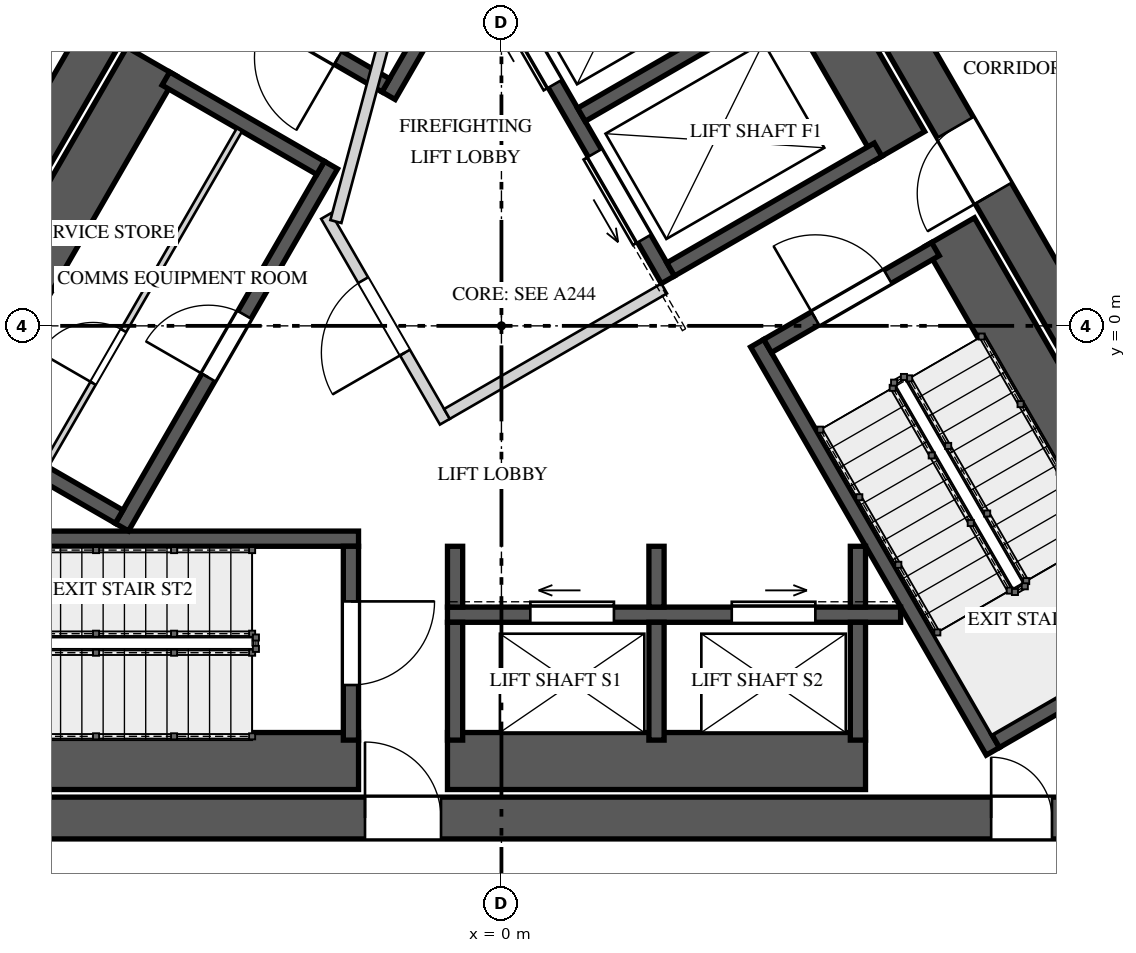
"""IFC4 building model, lengths in metres.
Left out: names, types, materials, properties, quantities, classifications, styles, units other than length and angle.
Written with IfcOpenShell. Run it as: python <this file> out.ifc"""

import sys

from ifc_helpers import new_model, si_unit, direction, frame, frame_2d, origin, place, context, subcontext, project, spatial, rectangle, extrude, element, fill, save


model = new_model("IFC4")
c1 = context("Model", 3, precision=1e-05, world=origin(), true_north=direction((0.0, 1.0)))
c2 = subcontext(c1, "Body", "Model", "MODEL_VIEW")
j1 = project(units=[si_unit("LENGTHUNIT", "METRE"), si_unit("PLANEANGLEUNIT", "RADIAN")], contexts=[c1])
p1 = place(None, origin())
s1 = spatial("IfcSite", under=j1, at=p1, CompositionType="ELEMENT")
p2 = place(p1, origin())
s2 = spatial("IfcBuilding", under=s1, at=p2, CompositionType="ELEMENT")
p3 = place(p2, frame((0.0, 0.0, 348.4)))
s3 = spatial("IfcBuildingStorey", under=s2, at=p3, CompositionType="ELEMENT", Elevation=348.4)
p4 = place(p3, frame((-1.285, 10.725, 0.0), z_axis=(0.0, 0.0, 1.0), x_axis=(-0.499994590896, -0.86602852671, 0.0)))
e1 = element("IfcWall", 1, at=p4, inside=s3, PredefinedType="SHEAR", context=c2, shape_type="SweptSolid", body=[
    extrude(rectangle(XDim=17.292, YDim=0.55, at=frame_2d((8.646, 0.0))), origin(), (0.0, 0.0, 1.0), 4.0),
])
p5 = place(p4, frame((6.851, 0.0, 0.0)))
e2 = element("IfcOpeningElement", 2, at=p5, cuts=e1, PredefinedType="OPENING", context=c2, shape_type="SweptSolid", body=[
    extrude(rectangle(XDim=1.0, YDim=2.4, at=frame_2d((0.5, 1.2))), frame((0.0, 0.285, 0.0), z_axis=(0.0, -1.0, 0.0), x_axis=(1.0, 0.0, 0.0)), (0.0, 0.0, 1.0), 0.57),
])
p6 = place(p4, frame((15.089, 0.0, 0.0)))
e3 = element("IfcOpeningElement", 3, at=p6, cuts=e1, PredefinedType="OPENING", context=c2, shape_type="SweptSolid", body=[
    extrude(rectangle(XDim=0.8, YDim=2.1, at=frame_2d((0.4, 1.05))), frame((0.0, 0.285, 0.0), z_axis=(0.0, -1.0, 0.0), x_axis=(1.0, 0.0, 0.0)), (0.0, 0.0, 1.0), 0.57),
])
p7 = place(p3, frame((-8.646, -6.475, 0.0), z_axis=(0.0, 0.0, 1.0), x_axis=(1.0, 0.0, 0.0)))
e4 = element("IfcWall", 4, at=p7, inside=s3, PredefinedType="SHEAR", context=c2, shape_type="SweptSolid", body=[
    extrude(rectangle(XDim=17.292, YDim=0.55, at=frame_2d((8.646, 0.0))), origin(), (0.0, 0.0, 1.0), 4.0),
])
p8 = place(p7, frame((6.851, 0.0, 0.0)))
e5 = element("IfcOpeningElement", 5, at=p8, cuts=e4, PredefinedType="OPENING", context=c2, shape_type="SweptSolid", body=[
    extrude(rectangle(XDim=1.0, YDim=2.4, at=frame_2d((0.5, 1.2))), frame((0.0, 0.285, 0.0), z_axis=(0.0, -1.0, 0.0), x_axis=(1.0, 0.0, 0.0)), (0.0, 0.0, 1.0), 0.57),
])
p9 = place(p7, frame((15.089, 0.0, 0.0)))
e6 = element("IfcOpeningElement", 6, at=p9, cuts=e4, PredefinedType="OPENING", context=c2, shape_type="SweptSolid", body=[
    extrude(rectangle(XDim=0.8, YDim=2.1, at=frame_2d((0.4, 1.05))), frame((0.0, 0.285, 0.0), z_axis=(0.0, -1.0, 0.0), x_axis=(1.0, 0.0, 0.0)), (0.0, 0.0, 1.0), 0.57),
])
p10 = place(p3, frame((9.93, -4.25, 0.0), z_axis=(0.0, 0.0, 1.0), x_axis=(-0.499994590896, 0.86602852671, 0.0)))
e7 = element("IfcWall", 7, at=p10, inside=s3, PredefinedType="SHEAR", context=c2, shape_type="SweptSolid", body=[
    extrude(rectangle(XDim=17.292, YDim=0.55, at=frame_2d((8.646, 0.0))), origin(), (0.0, 0.0, 1.0), 4.0),
])
p11 = place(p10, frame((6.921, 0.0, 0.0)))
e8 = element("IfcOpeningElement", 8, at=p11, cuts=e7, PredefinedType="OPENING", context=c2, shape_type="SweptSolid", body=[
    extrude(rectangle(XDim=1.0, YDim=2.4, at=frame_2d((0.5, 1.2))), frame((0.0, 0.285, 0.0), z_axis=(0.0, -1.0, 0.0), x_axis=(1.0, 0.0, 0.0)), (0.0, 0.0, 1.0), 0.57),
])
p12 = place(p3, frame((1.615, 8.397, 0.0), z_axis=(0.0, 0.0, 1.0), x_axis=(-0.500009909098, -0.866019682689, 0.0)))
e9 = element("IfcWall", 9, at=p12, inside=s3, PredefinedType="SOLIDWALL", context=c2, shape_type="SweptSolid", body=[
    extrude(rectangle(XDim=6.2, YDim=0.2, at=frame_2d((3.1, 0.0))), origin(), (0.0, 0.0, 1.0), 3.65),
])
p13 = place(p3, frame((-1.521, 3.165, 0.0), z_axis=(0.0, 0.0, 1.0), x_axis=(-0.866030925526, 0.499990435942, 0.0)))
e10 = element("IfcWall", 10, at=p13, inside=s3, PredefinedType="SOLIDWALL", context=c2, shape_type="SweptSolid", body=[
    extrude(rectangle(XDim=2.55, YDim=0.2, at=frame_2d((1.275, 0.0))), origin(), (0.0, 0.0, 1.0), 3.65),
])
p14 = place(p13, frame((0.725, 0.0, 0.0)))
e11 = element("IfcOpeningElement", 11, at=p14, cuts=e10, PredefinedType="OPENING", context=c2, shape_type="SweptSolid", body=[
    extrude(rectangle(XDim=1.1, YDim=2.4, at=frame_2d((0.55, 1.2))), frame((0.0, 0.11, 0.0), z_axis=(0.0, -1.0, 0.0), x_axis=(1.0, 0.0, 0.0)), (0.0, 0.0, 1.0), 0.22),
])
p15 = place(p3, frame((-8.08, -5.725, 0.0), z_axis=(0.0, 0.0, 1.0), x_axis=(1.0, 0.0, 0.0)))
e12 = element("IfcWall", 12, at=p15, inside=s3, PredefinedType="SOLIDWALL", context=c2, shape_type="SweptSolid", body=[
    extrude(rectangle(XDim=6.2, YDim=0.75, at=frame_2d((3.1, 0.0))), origin(), (0.0, 0.0, 1.0), 3.65),
])
p16 = place(p3, frame((-8.08, -2.8, 0.0), z_axis=(0.0, 0.0, 1.0), x_axis=(1.0, 0.0, 0.0)))
e13 = element("IfcWall", 13, at=p16, inside=s3, PredefinedType="SOLIDWALL", context=c2, shape_type="SweptSolid", body=[
    extrude(rectangle(XDim=6.2, YDim=0.2, at=frame_2d((3.1, 0.0))), origin(), (0.0, 0.0, 1.0), 3.65),
])
p17 = place(p3, frame((-1.98, -2.9, 0.0), z_axis=(0.0, 0.0, 1.0), x_axis=(0.0, -1.0, 0.0)))
e14 = element("IfcWall", 14, at=p17, inside=s3, PredefinedType="SOLIDWALL", context=c2, shape_type="SweptSolid", body=[
    extrude(rectangle(XDim=2.55, YDim=0.2, at=frame_2d((1.275, 0.0))), origin(), (0.0, 0.0, 1.0), 3.65),
])
p18 = place(p17, frame((0.725, 0.0, 0.0)))
e15 = element("IfcOpeningElement", 15, at=p18, cuts=e14, PredefinedType="OPENING", context=c2, shape_type="SweptSolid", body=[
    extrude(rectangle(XDim=1.1, YDim=2.4, at=frame_2d((0.55, 1.2))), frame((0.0, 0.11, 0.0), z_axis=(0.0, -1.0, 0.0), x_axis=(1.0, 0.0, 0.0)), (0.0, 0.0, 1.0), 0.22),
])
p19 = place(p3, frame((8.998, -4.135, 0.0), z_axis=(0.0, 0.0, 1.0), x_axis=(-0.500009909098, 0.866019682689, 0.0)))
e16 = element("IfcWall", 16, at=p19, inside=s3, PredefinedType="SOLIDWALL", context=c2, shape_type="SweptSolid", body=[
    extrude(rectangle(XDim=6.2, YDim=0.75, at=frame_2d((3.1, 0.0))), origin(), (0.0, 0.0, 1.0), 3.65),
])
p20 = place(p3, frame((6.465, -5.597, 0.0), z_axis=(0.0, 0.0, 1.0), x_axis=(-0.49998037582, 0.866036733513, 0.0)))
e17 = element("IfcWall", 17, at=p20, inside=s3, PredefinedType="SOLIDWALL", context=c2, shape_type="SweptSolid", body=[
    extrude(rectangle(XDim=6.2, YDim=0.2, at=frame_2d((3.1, 0.0))), origin(), (0.0, 0.0, 1.0), 3.65),
])
p21 = place(p3, frame((6.501, -5.461, 0.0), z_axis=(0.0, 0.0, 1.0), x_axis=(0.865989465428, 0.500062241894, 0.0)))
e18 = element("IfcWall", 18, at=p21, inside=s3, PredefinedType="SOLIDWALL", context=c2, shape_type="SweptSolid", body=[
    extrude(rectangle(XDim=2.55, YDim=0.2, at=frame_2d((1.275, 0.0))), origin(), (0.0, 0.0, 1.0), 3.65),
])
p22 = place(p3, frame((3.501, -0.265, 0.0), z_axis=(0.0, 0.0, 1.0), x_axis=(0.866030925526, 0.499990435942, 0.0)))
e19 = element("IfcWall", 19, at=p22, inside=s3, PredefinedType="SOLIDWALL", context=c2, shape_type="SweptSolid", body=[
    extrude(rectangle(XDim=2.55, YDim=0.2, at=frame_2d((1.275, 0.0))), origin(), (0.0, 0.0, 1.0), 3.65),
])
p23 = place(p22, frame((0.725, 0.0, 0.0)))
e20 = element("IfcOpeningElement", 20, at=p23, cuts=e19, PredefinedType="OPENING", context=c2, shape_type="SweptSolid", body=[
    extrude(rectangle(XDim=1.1, YDim=2.4, at=frame_2d((0.55, 1.2))), frame((0.0, 0.11, 0.0), z_axis=(0.0, -1.0, 0.0), x_axis=(1.0, 0.0, 0.0)), (0.0, 0.0, 1.0), 0.22),
])
p24 = place(p3, frame((-4.993, -2.648, 0.0), z_axis=(0.0, 0.0, 1.0), x_axis=(0.499996545922, 0.866027397988, 0.0)))
e21 = element("IfcWall", 21, at=p24, inside=s3, PredefinedType="SOLIDWALL", context=c2, shape_type="SweptSolid", body=[
    extrude(rectangle(XDim=5.5, YDim=0.2, at=frame_2d((2.75, 0.0))), origin(), (0.0, 0.0, 1.0), 3.65),
])
p25 = place(p24, frame((2.275, 0.0, 0.0)))
e22 = element("IfcOpeningElement", 22, at=p25, cuts=e21, PredefinedType="OPENING", context=c2, shape_type="SweptSolid", body=[
    extrude(rectangle(XDim=0.95, YDim=2.4, at=frame_2d((0.475, 1.2))), frame((0.0, 0.11, 0.0), z_axis=(0.0, -1.0, 0.0), x_axis=(1.0, 0.0, 0.0)), (0.0, 0.0, 1.0), 0.22),
])
p26 = place(p3, frame((-4.603, 3.477, 0.0), z_axis=(0.0, 0.0, 1.0), x_axis=(-0.500015767406, -0.866016300277, 0.0)))
e23 = element("IfcWall", 23, at=p26, inside=s3, PredefinedType="SOLIDWALL", context=c2, shape_type="SweptSolid", body=[
    extrude(rectangle(XDim=5.5, YDim=0.75, at=frame_2d((2.75, 0.0))), origin(), (0.0, 0.0, 1.0), 3.65),
])
p27 = place(p3, frame((-2.38, 2.078, 0.0), z_axis=(0.0, 0.0, 1.0), x_axis=(-0.866061024631, 0.499938297808, 0.0)))
e24 = element("IfcWall", 24, at=p27, inside=s3, PredefinedType="SOLIDWALL", context=c2, shape_type="SweptSolid", body=[
    extrude(rectangle(XDim=2.35, YDim=0.2, at=frame_2d((1.175, 0.0))), origin(), (0.0, 0.0, 1.0), 3.65),
])
p28 = place(p3, frame((-5.03, -2.512, 0.0), z_axis=(0.0, 0.0, 1.0), x_axis=(-0.866016039709, 0.500016218704, 0.0)))
e25 = element("IfcWall", 25, at=p28, inside=s3, PredefinedType="SOLIDWALL", context=c2, shape_type="SweptSolid", body=[
    extrude(rectangle(XDim=2.35, YDim=0.2, at=frame_2d((1.175, 0.0))), origin(), (0.0, 0.0, 1.0), 3.65),
])
p29 = place(p3, frame((-5.997, -1.838, 0.0), z_axis=(0.0, 0.0, 1.0), x_axis=(0.500005610874, 0.86602216432, 0.0)))
e26 = element("IfcWall", 26, at=p29, inside=s3, PredefinedType="PARTITIONING", context=c2, shape_type="SweptSolid", body=[
    extrude(rectangle(XDim=5.1, YDim=0.08, at=frame_2d((2.55, 0.0))), origin(), (0.0, 0.0, 1.0), 3.65),
])
p30 = place(p29, frame((1.25, 0.0, 0.0)))
e27 = element("IfcOpeningElement", 27, at=p30, cuts=e26, PredefinedType="OPENING", context=c2, shape_type="SweptSolid", body=[
    extrude(rectangle(XDim=0.8, YDim=2.1, at=frame_2d((0.4, 1.05))), frame((0.0, 0.05, 0.0), z_axis=(0.0, -1.0, 0.0), x_axis=(1.0, 0.0, 0.0)), (0.0, 0.0, 1.0), 0.1),
])
p31 = place(p3, frame((-0.71, -3.8, 0.0), z_axis=(0.0, 0.0, 1.0), x_axis=(1.0, 0.0, 0.0)))
e28 = element("IfcWall", 28, at=p31, inside=s3, PredefinedType="SOLIDWALL", context=c2, shape_type="SweptSolid", body=[
    extrude(rectangle(XDim=5.961, YDim=0.2, at=frame_2d((2.981, 0.0))), origin(), (0.0, 0.0, 1.0), 3.65),
])
p32 = place(p31, frame((1.09, 0.0, 0.0)))
e29 = element("IfcOpeningElement", 29, at=p32, cuts=e28, PredefinedType="OPENING", context=c2, shape_type="SweptSolid", body=[
    extrude(rectangle(XDim=1.1, YDim=2.1, at=frame_2d((0.55, 1.05))), frame((0.0, 0.11, 0.0), z_axis=(0.0, -1.0, 0.0), x_axis=(1.0, 0.0, 0.0)), (0.0, 0.0, 1.0), 0.22),
])
p33 = place(p31, frame((3.74, 0.0, 0.0)))
e30 = element("IfcOpeningElement", 30, at=p33, cuts=e28, PredefinedType="OPENING", context=c2, shape_type="SweptSolid", body=[
    extrude(rectangle(XDim=1.1, YDim=2.1, at=frame_2d((0.55, 1.05))), frame((0.0, 0.11, 0.0), z_axis=(0.0, -1.0, 0.0), x_axis=(1.0, 0.0, 0.0)), (0.0, 0.0, 1.0), 0.22),
])
p34 = place(p3, frame((-0.71, -5.725, 0.0), z_axis=(0.0, 0.0, 1.0), x_axis=(1.0, 0.0, 0.0)))
e31 = element("IfcWall", 31, at=p34, inside=s3, PredefinedType="SOLIDWALL", context=c2, shape_type="SweptSolid", body=[
    extrude(rectangle(XDim=5.5, YDim=0.75, at=frame_2d((2.75, 0.0))), origin(), (0.0, 0.0, 1.0), 3.65),
])
p35 = place(p3, frame((-0.61, -3.9, 0.0), z_axis=(0.0, 0.0, 1.0), x_axis=(0.0, -1.0, 0.0)))
e32 = element("IfcWall", 32, at=p35, inside=s3, PredefinedType="SOLIDWALL", context=c2, shape_type="SweptSolid", body=[
    extrude(rectangle(XDim=1.55, YDim=0.2, at=frame_2d((0.775, 0.0))), origin(), (0.0, 0.0, 1.0), 3.65),
])
p36 = place(p3, frame((-0.61, -2.9, 0.0), z_axis=(0.0, 0.0, 1.0), x_axis=(0.0, -1.0, 0.0)))
e33 = element("IfcWall", 33, at=p36, inside=s3, PredefinedType="SOLIDWALL", context=c2, shape_type="SweptSolid", body=[
    extrude(rectangle(XDim=0.8, YDim=0.2, at=frame_2d((0.4, 0.0))), origin(), (0.0, 0.0, 1.0), 3.65),
])
p37 = place(p3, frame((2.04, -3.9, 0.0), z_axis=(0.0, 0.0, 1.0), x_axis=(0.0, -1.0, 0.0)))
e34 = element("IfcWall", 34, at=p37, inside=s3, PredefinedType="SOLIDWALL", context=c2, shape_type="SweptSolid", body=[
    extrude(rectangle(XDim=1.55, YDim=0.2, at=frame_2d((0.775, 0.0))), origin(), (0.0, 0.0, 1.0), 3.65),
])
p38 = place(p3, frame((2.04, -2.9, 0.0), z_axis=(0.0, 0.0, 1.0), x_axis=(0.0, -1.0, 0.0)))
e35 = element("IfcWall", 35, at=p38, inside=s3, PredefinedType="SOLIDWALL", context=c2, shape_type="SweptSolid", body=[
    extrude(rectangle(XDim=0.8, YDim=0.2, at=frame_2d((0.4, 0.0))), origin(), (0.0, 0.0, 1.0), 3.65),
])
p39 = place(p3, frame((4.69, -3.9, 0.0), z_axis=(0.0, 0.0, 1.0), x_axis=(0.0, -1.0, 0.0)))
e36 = element("IfcWall", 36, at=p39, inside=s3, PredefinedType="SOLIDWALL", context=c2, shape_type="SweptSolid", body=[
    extrude(rectangle(XDim=1.55, YDim=0.2, at=frame_2d((0.775, 0.0))), origin(), (0.0, 0.0, 1.0), 3.65),
])
p40 = place(p3, frame((4.69, -2.9, 0.0), z_axis=(0.0, 0.0, 1.0), x_axis=(0.0, -1.0, 0.0)))
e37 = element("IfcWall", 37, at=p40, inside=s3, PredefinedType="SOLIDWALL", context=c2, shape_type="SweptSolid", body=[
    extrude(rectangle(XDim=0.8, YDim=0.2, at=frame_2d((0.4, 0.0))), origin(), (0.0, 0.0, 1.0), 3.65),
])
p41 = place(p3, frame((2.19, 0.606, 0.0), z_axis=(0.0, 0.0, 1.0), x_axis=(-0.500002801628, 0.866023786258, 0.0)))
e38 = element("IfcWall", 38, at=p41, inside=s3, PredefinedType="SOLIDWALL", context=c2, shape_type="SweptSolid", body=[
    extrude(rectangle(XDim=4.9, YDim=0.2, at=frame_2d((2.45, 0.0))), origin(), (0.0, 0.0, 1.0), 3.65),
])
p42 = place(p41, frame((0.625, 0.0, 0.0)))
e39 = element("IfcOpeningElement", 39, at=p42, cuts=e38, PredefinedType="OPENING", context=c2, shape_type="SweptSolid", body=[
    extrude(rectangle(XDim=1.3, YDim=2.1, at=frame_2d((0.65, 1.05))), frame((0.0, 0.11, 0.0), z_axis=(0.0, -1.0, 0.0), x_axis=(1.0, 0.0, 0.0)), (0.0, 0.0, 1.0), 0.22),
])
p43 = place(p41, frame((2.975, 0.0, 0.0)))
e40 = element("IfcOpeningElement", 40, at=p43, cuts=e38, PredefinedType="OPENING", context=c2, shape_type="SweptSolid", body=[
    extrude(rectangle(XDim=1.3, YDim=2.1, at=frame_2d((0.65, 1.05))), frame((0.0, 0.11, 0.0), z_axis=(0.0, -1.0, 0.0), x_axis=(1.0, 0.0, 0.0)), (0.0, 0.0, 1.0), 0.22),
])
p44 = place(p3, frame((5.243, 2.369, 0.0), z_axis=(0.0, 0.0, 1.0), x_axis=(-0.500002801628, 0.866023786258, 0.0)))
e41 = element("IfcWall", 41, at=p44, inside=s3, PredefinedType="SOLIDWALL", context=c2, shape_type="SweptSolid", body=[
    extrude(rectangle(XDim=4.9, YDim=0.75, at=frame_2d((2.45, 0.0))), origin(), (0.0, 0.0, 1.0), 3.65),
])
for number, where, z_axis, x_axis in (
    (42, (2.227, 0.743, 0.0), (0.0, 0.0, 1.0), (0.866, 0.5, 0.0)),
    (43, (1.052, 2.778, 0.0), (0.0, 0.0, 1.0), (0.866, 0.5, 0.0)),
):
    element("IfcWall", number, at=place(p3, frame(where, z_axis=z_axis, x_axis=x_axis)), inside=s3, PredefinedType="SOLIDWALL", context=c2, shape_type="SweptSolid", body=[
        extrude(rectangle(XDim=3.15, YDim=0.2, at=frame_2d((1.575, 0.0))), origin(), (0.0, 0.0, 1.0), 3.65),
    ])
p45 = place(p3, frame((-0.744, -1.261, 0.0), z_axis=(0.0, 0.0, 1.0), x_axis=(-0.500004234368, 0.866022959057, 0.0)))
e44 = element("IfcWall", 44, at=p45, inside=s3, PredefinedType="PARTITIONING", context=c2, shape_type="SweptSolid", body=[
    extrude(rectangle(XDim=3.125, YDim=0.15, at=frame_2d((1.562, 0.0))), origin(), (0.0, 0.0, 1.0), 3.65),
])
p46 = place(p45, frame((1.05, 0.0, 0.0)))
e45 = element("IfcOpeningElement", 45, at=p46, cuts=e44, PredefinedType="OPENING", context=c2, shape_type="SweptSolid", body=[
    extrude(rectangle(XDim=1.1, YDim=2.4, at=frame_2d((0.55, 1.2))), frame((0.0, 0.085, 0.0), z_axis=(0.0, -1.0, 0.0), x_axis=(1.0, 0.0, 0.0)), (0.0, 0.0, 1.0), 0.17),
])
p47 = place(p3, frame((-0.717, -1.159, 0.0), z_axis=(0.0, 0.0, 1.0), x_axis=(0.866008176907, 0.50002983664, 0.0)))
e46 = element("IfcWall", 46, at=p47, inside=s3, PredefinedType="PARTITIONING", context=c2, shape_type="SweptSolid", body=[
    extrude(rectangle(XDim=3.3, YDim=0.15, at=frame_2d((1.65, 0.0))), origin(), (0.0, 0.0, 1.0), 3.65),
])
p48 = place(p3, frame((-2.178, 1.372, 0.0), z_axis=(0.0, 0.0, 1.0), x_axis=(0.258808958833, 0.96592852884, 0.0)))
e47 = element("IfcWall", 47, at=p48, inside=s3, PredefinedType="PARTITIONING", context=c2, shape_type="SweptSolid", body=[
    extrude(rectangle(XDim=2.903, YDim=0.15, at=frame_2d((1.451, 0.0))), origin(), (0.0, 0.0, 1.0), 3.65),
])
p49 = place(p3, frame((7.146, 4.722, 0.0), z_axis=(0.0, 0.0, 1.0), x_axis=(0.499955681623, -0.866050989499, 0.0)))
e48 = element("IfcWall", 48, at=p49, inside=s3, PredefinedType="SOLIDWALL", context=c2, shape_type="SweptSolid", body=[
    extrude(rectangle(XDim=1.238, YDim=0.2, at=frame_2d((0.619, 0.0))), origin(), (0.0, 0.0, 1.0), 3.65),
])
p50 = place(p14, origin())
e49 = element("IfcDoor", 49, at=p50, inside=s3, OperationType="SINGLE_SWING_RIGHT", PredefinedType="DOOR", context=c2, shape_type="SweptSolid", body=[
    extrude(rectangle(XDim=1.1, YDim=2.4, at=frame_2d((0.55, 1.2))), frame((0.0, 0.025, 0.0), z_axis=(0.0, -1.0, 0.0), x_axis=(1.0, 0.0, 0.0)), (0.0, 0.0, 1.0), 0.05),
])
fill(e11, e49)
p51 = place(p18, origin())
e50 = element("IfcDoor", 50, at=p51, inside=s3, OperationType="SINGLE_SWING_LEFT", PredefinedType="DOOR", context=c2, shape_type="SweptSolid", body=[
    extrude(rectangle(XDim=1.1, YDim=2.4, at=frame_2d((0.55, 1.2))), frame((0.0, 0.025, 0.0), z_axis=(0.0, -1.0, 0.0), x_axis=(1.0, 0.0, 0.0)), (0.0, 0.0, 1.0), 0.05),
])
fill(e15, e50)
p52 = place(p23, origin())
e51 = element("IfcDoor", 51, at=p52, inside=s3, OperationType="SINGLE_SWING_RIGHT", PredefinedType="DOOR", context=c2, shape_type="SweptSolid", body=[
    extrude(rectangle(XDim=1.1, YDim=2.4, at=frame_2d((0.55, 1.2))), frame((0.0, 0.025, 0.0), z_axis=(0.0, -1.0, 0.0), x_axis=(1.0, 0.0, 0.0)), (0.0, 0.0, 1.0), 0.05),
])
fill(e20, e51)
p53 = place(p25, origin())
e52 = element("IfcDoor", 52, at=p53, inside=s3, OperationType="SINGLE_SWING_LEFT", PredefinedType="DOOR", context=c2, shape_type="SweptSolid", body=[
    extrude(rectangle(XDim=0.95, YDim=2.4, at=frame_2d((0.475, 1.2))), frame((0.0, 0.025, 0.0), z_axis=(0.0, -1.0, 0.0), x_axis=(1.0, 0.0, 0.0)), (0.0, 0.0, 1.0), 0.05),
])
fill(e22, e52)
p54 = place(p30, origin())
e53 = element("IfcDoor", 53, at=p54, inside=s3, OperationType="SINGLE_SWING_RIGHT", PredefinedType="DOOR", context=c2, shape_type="SweptSolid", body=[
    extrude(rectangle(XDim=0.8, YDim=2.1, at=frame_2d((0.4, 1.05))), frame((0.0, 0.025, 0.0), z_axis=(0.0, -1.0, 0.0), x_axis=(1.0, 0.0, 0.0)), (0.0, 0.0, 1.0), 0.05),
])
fill(e27, e53)
p55 = place(p32, origin())
e54 = element("IfcDoor", 54, at=p55, inside=s3, OperationType="SLIDING_TO_LEFT", PredefinedType="DOOR", context=c2, shape_type="SweptSolid", body=[
    extrude(rectangle(XDim=1.1, YDim=2.1, at=frame_2d((0.55, 1.05))), frame((0.0, 0.025, 0.0), z_axis=(0.0, -1.0, 0.0), x_axis=(1.0, 0.0, 0.0)), (0.0, 0.0, 1.0), 0.05),
])
fill(e29, e54)
p56 = place(p33, origin())
e55 = element("IfcDoor", 55, at=p56, inside=s3, OperationType="SLIDING_TO_RIGHT", PredefinedType="DOOR", context=c2, shape_type="SweptSolid", body=[
    extrude(rectangle(XDim=1.1, YDim=2.1, at=frame_2d((0.55, 1.05))), frame((0.0, 0.025, 0.0), z_axis=(0.0, -1.0, 0.0), x_axis=(1.0, 0.0, 0.0)), (0.0, 0.0, 1.0), 0.05),
])
fill(e30, e55)
p57 = place(p42, origin())
e56 = element("IfcDoor", 56, at=p57, inside=s3, OperationType="SLIDING_TO_LEFT", PredefinedType="DOOR", context=c2, shape_type="SweptSolid", body=[
    extrude(rectangle(XDim=1.3, YDim=2.1, at=frame_2d((0.65, 1.05))), frame((0.0, 0.025, 0.0), z_axis=(0.0, -1.0, 0.0), x_axis=(1.0, 0.0, 0.0)), (0.0, 0.0, 1.0), 0.05),
])
fill(e39, e56)
p58 = place(p43, origin())
e57 = element("IfcDoor", 57, at=p58, inside=s3, OperationType="SLIDING_TO_RIGHT", PredefinedType="DOOR", context=c2, shape_type="SweptSolid", body=[
    extrude(rectangle(XDim=1.3, YDim=2.1, at=frame_2d((0.65, 1.05))), frame((0.0, 0.025, 0.0), z_axis=(0.0, -1.0, 0.0), x_axis=(1.0, 0.0, 0.0)), (0.0, 0.0, 1.0), 0.05),
])
fill(e40, e57)
p59 = place(p46, origin())
e58 = element("IfcDoor", 58, at=p59, inside=s3, OperationType="SINGLE_SWING_LEFT", PredefinedType="DOOR", context=c2, shape_type="SweptSolid", body=[
    extrude(rectangle(XDim=1.1, YDim=2.4, at=frame_2d((0.55, 1.2))), frame((0.0, 0.025, 0.0), z_axis=(0.0, -1.0, 0.0), x_axis=(1.0, 0.0, 0.0)), (0.0, 0.0, 1.0), 0.05),
])
fill(e45, e58)
p60 = place(p8, origin())
e59 = element("IfcDoor", 59, at=p60, inside=s3, OperationType="SINGLE_SWING_LEFT", PredefinedType="DOOR", context=c2, shape_type="SweptSolid", body=[
    extrude(rectangle(XDim=1.0, YDim=2.4, at=frame_2d((0.5, 1.2))), frame((0.0, 0.025, 0.0), z_axis=(0.0, -1.0, 0.0), x_axis=(1.0, 0.0, 0.0)), (0.0, 0.0, 1.0), 0.05),
])
fill(e5, e59)
p61 = place(p11, origin())
e60 = element("IfcDoor", 60, at=p61, inside=s3, OperationType="SINGLE_SWING_RIGHT", PredefinedType="DOOR", context=c2, shape_type="SweptSolid", body=[
    extrude(rectangle(XDim=1.0, YDim=2.4, at=frame_2d((0.5, 1.2))), frame((0.0, 0.025, 0.0), z_axis=(0.0, -1.0, 0.0), x_axis=(1.0, 0.0, 0.0)), (0.0, 0.0, 1.0), 0.05),
])
fill(e8, e60)
p62 = place(p9, origin())
e61 = element("IfcDoor", 61, at=p62, inside=s3, OperationType="SINGLE_SWING_RIGHT", PredefinedType="DOOR", context=c2, shape_type="SweptSolid", body=[
    extrude(rectangle(XDim=0.8, YDim=2.1, at=frame_2d((0.4, 1.05))), frame((0.0, 0.025, 0.0), z_axis=(0.0, -1.0, 0.0), x_axis=(1.0, 0.0, 0.0)), (0.0, 0.0, 1.0), 0.05),
])
fill(e6, e61)
save(model, sys.argv[1])
